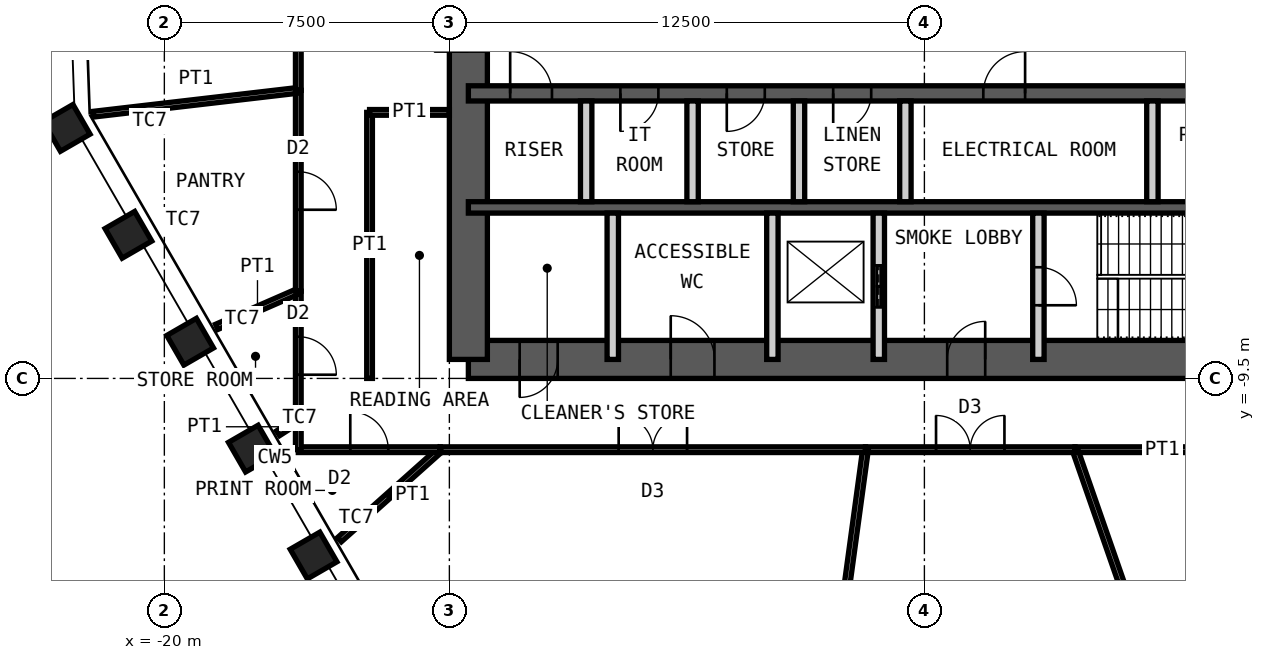
"""IFC4 building model, lengths in metres.
Left out: names, types, materials, properties, quantities, classifications, styles, units other than length and angle.
Written with IfcOpenShell. Run it as: python <this file> out.ifc"""

import sys

from ifc_helpers import new_model, si_unit, direction, frame, frame_2d, origin, origin_2d, place, context, subcontext, project, spatial, rectangle, hollow_rectangle, extrude, element, fill, save


model = new_model("IFC4")
c1 = context("Model", 3, precision=1e-05, world=origin(), true_north=direction((0.0, 1.0)))
c2 = subcontext(c1, "Body", "Model", "MODEL_VIEW")
j1 = project(units=[si_unit("LENGTHUNIT", "METRE"), si_unit("PLANEANGLEUNIT", "RADIAN")], contexts=[c1])
p1 = place(None, origin())
s1 = spatial("IfcSite", under=j1, at=p1, CompositionType="ELEMENT")
p2 = place(p1, origin())
s2 = spatial("IfcBuilding", under=s1, at=p2, CompositionType="ELEMENT")
p3 = place(p2, frame((0.0, 0.0, 287.2)))
s3 = spatial("IfcBuildingStorey", under=s2, at=p3, CompositionType="ELEMENT", Elevation=287.2)
for number, where, z_axis, x_axis in (
    (1, (-16.073, -14.16, 0.0), (0.0, 0.0, 1.0), (0.5, -0.866, 0.0)),
    (2, (-17.698, -11.347, 0.0), (0.0, 0.0, 1.0), (0.5, -0.866, 0.0)),
    (3, (-19.322, -8.534, 0.0), (0.0, 0.0, 1.0), (0.5, -0.866, 0.0)),
    (4, (-20.946, -5.721, 0.0), (0.0, 0.0, 1.0), (0.5, -0.866, 0.0)),
    (5, (-22.57, -2.908, 0.0), (0.0, 0.0, 1.0), (0.5, -0.866, 0.0)),
):
    element("IfcColumn", number, at=place(p3, frame(where, z_axis=z_axis, x_axis=x_axis)), inside=s3, PredefinedType="COLUMN", context=c2, shape_type="SweptSolid", body=[
        extrude(hollow_rectangle(XDim=0.9, YDim=0.9, WallThickness=0.06, at=origin_2d()), origin(), (0.0, 0.0, 1.0), 4.2),
    ])
p4 = place(p3, frame((-12.0, -9.0, 0.0), z_axis=(0.0, 0.0, 1.0), x_axis=(1.0, 0.0, 0.0)))
e6 = element("IfcWall", 6, at=p4, inside=s3, PredefinedType="SHEAR", context=c2, shape_type="SweptSolid", body=[
    extrude(rectangle(XDim=24.0, YDim=1.0, at=frame_2d((12.0, 0.0))), origin(), (0.0, 0.0, 1.0), 4.2),
])
p5 = place(p4, frame((1.35, 0.0, 0.0)))
e7 = element("IfcOpeningElement", 7, at=p5, cuts=e6, PredefinedType="OPENING", context=c2, shape_type="SweptSolid", body=[
    extrude(rectangle(XDim=1.0, YDim=2.1, at=frame_2d((0.5, 1.05))), frame((0.0, 0.51, 0.0), z_axis=(0.0, -1.0, 0.0), x_axis=(1.0, 0.0, 0.0)), (0.0, 0.0, 1.0), 1.02),
])
p6 = place(p4, frame((5.325, 0.0, 0.0)))
e8 = element("IfcOpeningElement", 8, at=p6, cuts=e6, PredefinedType="OPENING", context=c2, shape_type="SweptSolid", body=[
    extrude(rectangle(XDim=1.15, YDim=2.1, at=frame_2d((0.575, 1.05))), frame((0.0, 0.51, 0.0), z_axis=(0.0, -1.0, 0.0), x_axis=(1.0, 0.0, 0.0)), (0.0, 0.0, 1.0), 1.02),
])
p7 = place(p4, frame((12.6, 0.0, 0.0)))
e9 = element("IfcOpeningElement", 9, at=p7, cuts=e6, PredefinedType="OPENING", context=c2, shape_type="SweptSolid", body=[
    extrude(rectangle(XDim=1.0, YDim=2.1, at=frame_2d((0.5, 1.05))), frame((0.0, 0.51, 0.0), z_axis=(0.0, -1.0, 0.0), x_axis=(1.0, 0.0, 0.0)), (0.0, 0.0, 1.0), 1.02),
])
p8 = place(p3, frame((-12.0, -9.0, 0.0), z_axis=(0.0, 0.0, 1.0), x_axis=(0.0, 1.0, 0.0)))
e10 = element("IfcWall", 10, at=p8, inside=s3, PredefinedType="SHEAR", context=c2, shape_type="SweptSolid", body=[
    extrude(rectangle(XDim=18.0, YDim=1.0, at=frame_2d((9.0, 0.0))), origin(), (0.0, 0.0, 1.0), 4.2),
])
p9 = place(p8, frame((8.1, 0.0, 0.0)))
e11 = element("IfcOpeningElement", 11, at=p9, cuts=e10, PredefinedType="OPENING", context=c2, shape_type="SweptSolid", body=[
    extrude(rectangle(XDim=1.8, YDim=2.1, at=frame_2d((0.9, 1.05))), frame((0.0, 0.51, 0.0), z_axis=(0.0, -1.0, 0.0), x_axis=(1.0, 0.0, 0.0)), (0.0, 0.0, 1.0), 1.02),
])
p10 = place(p3, frame((-12.0, -2.0, 0.0), z_axis=(0.0, 0.0, 1.0), x_axis=(1.0, 0.0, 0.0)))
e12 = element("IfcWall", 12, at=p10, inside=s3, PredefinedType="SHEAR", context=c2, shape_type="SweptSolid", body=[
    extrude(rectangle(XDim=24.0, YDim=0.4, at=frame_2d((12.0, 0.0))), origin(), (0.0, 0.0, 1.0), 4.2),
])
p11 = place(p10, frame((1.1, 0.0, 0.0)))
e13 = element("IfcOpeningElement", 13, at=p11, cuts=e12, PredefinedType="OPENING", context=c2, shape_type="SweptSolid", body=[
    extrude(rectangle(XDim=1.1, YDim=2.1, at=frame_2d((0.55, 1.05))), frame((0.0, 0.21, 0.0), z_axis=(0.0, -1.0, 0.0), x_axis=(1.0, 0.0, 0.0)), (0.0, 0.0, 1.0), 0.42),
])
p12 = place(p10, frame((13.55, 0.0, 0.0)))
e14 = element("IfcOpeningElement", 14, at=p12, cuts=e12, PredefinedType="OPENING", context=c2, shape_type="SweptSolid", body=[
    extrude(rectangle(XDim=1.1, YDim=2.1, at=frame_2d((0.55, 1.05))), frame((0.0, 0.21, 0.0), z_axis=(0.0, -1.0, 0.0), x_axis=(1.0, 0.0, 0.0)), (0.0, 0.0, 1.0), 0.42),
])
p13 = place(p10, frame((20.7, 0.0, 0.0)))
e15 = element("IfcOpeningElement", 15, at=p13, cuts=e12, PredefinedType="OPENING", context=c2, shape_type="SweptSolid", body=[
    extrude(rectangle(XDim=1.1, YDim=2.1, at=frame_2d((0.55, 1.05))), frame((0.0, 0.21, 0.0), z_axis=(0.0, -1.0, 0.0), x_axis=(1.0, 0.0, 0.0)), (0.0, 0.0, 1.0), 0.42),
])
p14 = place(p10, frame((4.0, 0.0, 0.0)))
e16 = element("IfcOpeningElement", 16, at=p14, cuts=e12, PredefinedType="OPENING", context=c2, shape_type="SweptSolid", body=[
    extrude(rectangle(XDim=1.0, YDim=2.1, at=frame_2d((0.5, 1.05))), frame((0.0, 0.21, 0.0), z_axis=(0.0, -1.0, 0.0), x_axis=(1.0, 0.0, 0.0)), (0.0, 0.0, 1.0), 0.42),
])
p15 = place(p10, frame((6.8, 0.0, 0.0)))
e17 = element("IfcOpeningElement", 17, at=p15, cuts=e12, PredefinedType="OPENING", context=c2, shape_type="SweptSolid", body=[
    extrude(rectangle(XDim=1.0, YDim=2.1, at=frame_2d((0.5, 1.05))), frame((0.0, 0.21, 0.0), z_axis=(0.0, -1.0, 0.0), x_axis=(1.0, 0.0, 0.0)), (0.0, 0.0, 1.0), 0.42),
])
p16 = place(p10, frame((9.6, 0.0, 0.0)))
e18 = element("IfcOpeningElement", 18, at=p16, cuts=e12, PredefinedType="OPENING", context=c2, shape_type="SweptSolid", body=[
    extrude(rectangle(XDim=1.0, YDim=2.1, at=frame_2d((0.5, 1.05))), frame((0.0, 0.21, 0.0), z_axis=(0.0, -1.0, 0.0), x_axis=(1.0, 0.0, 0.0)), (0.0, 0.0, 1.0), 0.42),
])
p17 = place(p3, frame((-12.0, -5.0, 0.0), z_axis=(0.0, 0.0, 1.0), x_axis=(1.0, 0.0, 0.0)))
e19 = element("IfcWall", 19, at=p17, inside=s3, PredefinedType="SHEAR", context=c2, shape_type="SweptSolid", body=[
    extrude(rectangle(XDim=24.0, YDim=0.3, at=frame_2d((12.0, 0.0))), origin(), (0.0, 0.0, 1.0), 4.2),
])
for number, where, z_axis, x_axis in (
    (20, (-8.9, -4.85, 0.0), (0.0, 0.0, 1.0), (0.0, 1.0, 0.0)),
    (21, (-6.1, -4.85, 0.0), (0.0, 0.0, 1.0), (0.0, 1.0, 0.0)),
    (22, (-3.3, -4.85, 0.0), (0.0, 0.0, 1.0), (0.0, 1.0, 0.0)),
    (23, (-0.5, -4.85, 0.0), (0.0, 0.0, 1.0), (0.0, 1.0, 0.0)),
    (24, (6.0, -4.85, 0.0), (0.0, 0.0, 1.0), (0.0, 1.0, 0.0)),
):
    element("IfcWall", number, at=place(p3, frame(where, z_axis=z_axis, x_axis=x_axis)), inside=s3, PredefinedType="PARTITIONING", context=c2, shape_type="SweptSolid", body=[
        extrude(rectangle(XDim=2.65, YDim=0.3, at=frame_2d((1.325, 0.0))), origin(), (0.0, 0.0, 1.0), 3.98),
    ])
for number, where, z_axis, x_axis in (
    (25, (-8.2, -9.0, 0.0), (0.0, 0.0, 1.0), (0.0, 1.0, 0.0)),
    (26, (-4.0, -9.0, 0.0), (0.0, 0.0, 1.0), (0.0, 1.0, 0.0)),
):
    element("IfcWall", number, at=place(p3, frame(where, z_axis=z_axis, x_axis=x_axis)), inside=s3, PredefinedType="PARTITIONING", context=c2, shape_type="SweptSolid", body=[
        extrude(rectangle(XDim=3.85, YDim=0.3, at=frame_2d((1.925, 0.0))), origin(), (0.0, 0.0, 1.0), 3.98),
    ])
p18 = place(p3, frame((-1.2, -9.0, 0.0), z_axis=(0.0, 0.0, 1.0), x_axis=(0.0, 1.0, 0.0)))
e27 = element("IfcWall", 27, at=p18, inside=s3, PredefinedType="PARTITIONING", context=c2, shape_type="SweptSolid", body=[
    extrude(rectangle(XDim=3.85, YDim=0.3, at=frame_2d((1.925, 0.0))), origin(), (0.0, 0.0, 1.0), 3.98),
])
p19 = place(p18, frame((1.375, 0.0, 0.0)))
e28 = element("IfcOpeningElement", 28, at=p19, cuts=e27, PredefinedType="OPENING", context=c2, shape_type="SweptSolid", body=[
    extrude(rectangle(XDim=1.1, YDim=2.4, at=frame_2d((0.55, 1.2))), frame((0.0, 0.16, 0.0), z_axis=(0.0, -1.0, 0.0), x_axis=(1.0, 0.0, 0.0)), (0.0, 0.0, 1.0), 0.32),
])
p20 = place(p3, frame((3.0, -9.0, 0.0), z_axis=(0.0, 0.0, 1.0), x_axis=(0.0, 1.0, 0.0)))
e29 = element("IfcWall", 29, at=p20, inside=s3, PredefinedType="PARTITIONING", context=c2, shape_type="SweptSolid", body=[
    extrude(rectangle(XDim=3.85, YDim=0.3, at=frame_2d((1.925, 0.0))), origin(), (0.0, 0.0, 1.0), 3.98),
])
p21 = place(p20, frame((1.425, 0.0, 0.0)))
e30 = element("IfcOpeningElement", 30, at=p21, cuts=e29, PredefinedType="OPENING", context=c2, shape_type="SweptSolid", body=[
    extrude(rectangle(XDim=1.0, YDim=2.1, at=frame_2d((0.5, 1.05))), frame((0.0, 0.16, 0.0), z_axis=(0.0, -1.0, 0.0), x_axis=(1.0, 0.0, 0.0)), (0.0, 0.0, 1.0), 0.32),
])
p22 = place(p3, frame((15.44, -11.375, 0.0), z_axis=(0.0, 0.0, 1.0), x_axis=(-1.0, 0.0, 0.0)))
e31 = element("IfcWall", 31, at=p22, inside=s3, PredefinedType="PARTITIONING", context=c2, shape_type="SweptSolid", body=[
    extrude(rectangle(XDim=11.477, YDim=0.15, at=frame_2d((5.739, 0.0))), origin(), (0.0, 0.0, 1.0), 4.03),
])
p23 = place(p22, frame((4.839, 0.0, 0.0)))
e32 = element("IfcOpeningElement", 32, at=p23, cuts=e31, PredefinedType="OPENING", context=c2, shape_type="SweptSolid", body=[
    extrude(rectangle(XDim=1.8, YDim=2.4, at=frame_2d((0.9, 1.2))), frame((0.0, 0.085, 0.0), z_axis=(0.0, -1.0, 0.0), x_axis=(1.0, 0.0, 0.0)), (0.0, 0.0, 1.0), 0.17),
])
p24 = place(p3, frame((6.888, -19.771, 0.0), z_axis=(0.0, 0.0, 1.0), x_axis=(-0.328983865825, 0.944335542075, 0.0)))
e33 = element("IfcWall", 33, at=p24, inside=s3, PredefinedType="PARTITIONING", context=c2, shape_type="SweptSolid", body=[
    extrude(rectangle(XDim=8.891, YDim=0.15, at=frame_2d((4.446, 0.0))), origin(), (0.0, 0.0, 1.0), 3.33),
])
p25 = place(p3, frame((3.963, -11.375, 0.0), z_axis=(0.0, 0.0, 1.0), x_axis=(-1.0, 0.0, 0.0)))
e34 = element("IfcWall", 34, at=p25, inside=s3, PredefinedType="PARTITIONING", context=c2, shape_type="SweptSolid", body=[
    extrude(rectangle(XDim=5.513, YDim=0.15, at=frame_2d((2.756, 0.0))), origin(), (0.0, 0.0, 1.0), 4.03),
])
p26 = place(p25, frame((1.856, 0.0, 0.0)))
e35 = element("IfcOpeningElement", 35, at=p26, cuts=e34, PredefinedType="OPENING", context=c2, shape_type="SweptSolid", body=[
    extrude(rectangle(XDim=1.8, YDim=2.4, at=frame_2d((0.9, 1.2))), frame((0.0, 0.085, 0.0), z_axis=(0.0, -1.0, 0.0), x_axis=(1.0, 0.0, 0.0)), (0.0, 0.0, 1.0), 0.17),
])
p27 = place(p3, frame((-2.786, -20.446, 0.0), z_axis=(0.0, 0.0, 1.0), x_axis=(0.135041803834, 0.99083990191, 0.0)))
e36 = element("IfcWall", 36, at=p27, inside=s3, PredefinedType="PARTITIONING", context=c2, shape_type="SweptSolid", body=[
    extrude(rectangle(XDim=9.155, YDim=0.15, at=frame_2d((4.578, 0.0))), origin(), (0.0, 0.0, 1.0), 3.33),
])
p28 = place(p3, frame((-1.55, -11.375, 0.0), z_axis=(0.0, 0.0, 1.0), x_axis=(-1.0, 0.0, 0.0)))
e37 = element("IfcWall", 37, at=p28, inside=s3, PredefinedType="PARTITIONING", context=c2, shape_type="SweptSolid", body=[
    extrude(rectangle(XDim=11.19, YDim=0.15, at=frame_2d((5.595, 0.0))), origin(), (0.0, 0.0, 1.0), 4.03),
])
p29 = place(p28, frame((4.695, 0.0, 0.0)))
e38 = element("IfcOpeningElement", 38, at=p29, cuts=e37, PredefinedType="OPENING", context=c2, shape_type="SweptSolid", body=[
    extrude(rectangle(XDim=1.8, YDim=2.4, at=frame_2d((0.9, 1.2))), frame((0.0, 0.085, 0.0), z_axis=(0.0, -1.0, 0.0), x_axis=(1.0, 0.0, 0.0)), (0.0, 0.0, 1.0), 0.17),
])
p30 = place(p3, frame((-15.393, -13.743, 0.0), z_axis=(0.0, 0.0, 1.0), x_axis=(0.745934007174, 0.666019862273, 0.0)))
e39 = element("IfcWall", 39, at=p30, inside=s3, PredefinedType="PARTITIONING", context=c2, shape_type="SweptSolid", body=[
    extrude(rectangle(XDim=3.556, YDim=0.15, at=frame_2d((1.778, 0.0))), origin(), (0.0, 0.0, 1.0), 3.33),
])
p31 = place(p3, frame((-12.74, -11.375, 0.0), z_axis=(0.0, 0.0, 1.0), x_axis=(-1.0, 0.0, 0.0)))
e40 = element("IfcWall", 40, at=p31, inside=s3, PredefinedType="PARTITIONING", context=c2, shape_type="SweptSolid", body=[
    extrude(rectangle(XDim=3.735, YDim=0.15, at=frame_2d((1.868, 0.0))), origin(), (0.0, 0.0, 1.0), 4.03),
])
p32 = place(p31, frame((1.367, 0.0, 0.0)))
e41 = element("IfcOpeningElement", 41, at=p32, cuts=e40, PredefinedType="OPENING", context=c2, shape_type="SweptSolid", body=[
    extrude(rectangle(XDim=1.0, YDim=2.4, at=frame_2d((0.5, 1.2))), frame((0.0, 0.085, 0.0), z_axis=(0.0, -1.0, 0.0), x_axis=(1.0, 0.0, 0.0)), (0.0, 0.0, 1.0), 0.17),
])
p33 = place(p3, frame((-16.475, -11.375, 0.0), z_axis=(0.0, 0.0, 1.0), x_axis=(0.0, 1.0, 0.0)))
e42 = element("IfcWall", 42, at=p33, inside=s3, PredefinedType="PARTITIONING", context=c2, shape_type="SweptSolid", body=[
    extrude(rectangle(XDim=0.774, YDim=0.15, at=frame_2d((0.387, 0.0))), origin(), (0.0, 0.0, 1.0), 4.03),
])
p34 = place(p3, frame((-17.007, -10.943, 0.0), z_axis=(0.0, 0.0, 1.0), x_axis=(0.840789611822, 0.541362012568, 0.0)))
e43 = element("IfcWall", 43, at=p34, inside=s3, PredefinedType="PARTITIONING", context=c2, shape_type="SweptSolid", body=[
    extrude(rectangle(XDim=0.633, YDim=0.15, at=frame_2d((0.316, 0.0))), origin(), (0.0, 0.0, 1.0), 3.33),
])
p35 = place(p3, frame((-16.475, -10.601, 0.0), z_axis=(0.0, 0.0, 1.0), x_axis=(0.0, 1.0, 0.0)))
e44 = element("IfcWall", 44, at=p35, inside=s3, PredefinedType="PARTITIONING", context=c2, shape_type="SweptSolid", body=[
    extrude(rectangle(XDim=3.396, YDim=0.15, at=frame_2d((1.698, 0.0))), origin(), (0.0, 0.0, 1.0), 4.03),
])
p36 = place(p35, frame((1.198, 0.0, 0.0)))
e45 = element("IfcOpeningElement", 45, at=p36, cuts=e44, PredefinedType="OPENING", context=c2, shape_type="SweptSolid", body=[
    extrude(rectangle(XDim=1.0, YDim=2.4, at=frame_2d((0.5, 1.2))), frame((0.0, 0.085, 0.0), z_axis=(0.0, -1.0, 0.0), x_axis=(1.0, 0.0, 0.0)), (0.0, 0.0, 1.0), 0.17),
])
p37 = place(p3, frame((-18.624, -8.144, 0.0), z_axis=(0.0, 0.0, 1.0), x_axis=(0.916195562442, 0.400731445436, 0.0)))
e46 = element("IfcWall", 46, at=p37, inside=s3, PredefinedType="PARTITIONING", context=c2, shape_type="SweptSolid", body=[
    extrude(rectangle(XDim=2.345, YDim=0.15, at=frame_2d((1.172, 0.0))), origin(), (0.0, 0.0, 1.0), 3.33),
])
p38 = place(p3, frame((-16.475, -7.205, 0.0), z_axis=(0.0, 0.0, 1.0), x_axis=(0.0, 1.0, 0.0)))
e47 = element("IfcWall", 47, at=p38, inside=s3, PredefinedType="PARTITIONING", context=c2, shape_type="SweptSolid", body=[
    extrude(rectangle(XDim=5.285, YDim=0.15, at=frame_2d((2.643, 0.0))), origin(), (0.0, 0.0, 1.0), 4.03),
])
p39 = place(p38, frame((2.143, 0.0, 0.0)))
e48 = element("IfcOpeningElement", 48, at=p39, cuts=e47, PredefinedType="OPENING", context=c2, shape_type="SweptSolid", body=[
    extrude(rectangle(XDim=1.0, YDim=2.4, at=frame_2d((0.5, 1.2))), frame((0.0, 0.085, 0.0), z_axis=(0.0, -1.0, 0.0), x_axis=(1.0, 0.0, 0.0)), (0.0, 0.0, 1.0), 0.17),
])
p40 = place(p3, frame((-21.864, -2.547, 0.0), z_axis=(0.0, 0.0, 1.0), x_axis=(0.993284789299, 0.115694975458, 0.0)))
e49 = element("IfcWall", 49, at=p40, inside=s3, PredefinedType="PARTITIONING", context=c2, shape_type="SweptSolid", body=[
    extrude(rectangle(XDim=5.425, YDim=0.15, at=frame_2d((2.713, 0.0))), origin(), (0.0, 0.0, 1.0), 2.93),
])
p41 = place(p3, frame((-16.475, -1.919, 0.0), z_axis=(0.0, 0.0, 1.0), x_axis=(0.0, 1.0, 0.0)))
e50 = element("IfcWall", 50, at=p41, inside=s3, PredefinedType="PARTITIONING", context=c2, shape_type="SweptSolid", body=[
    extrude(rectangle(XDim=13.294, YDim=0.15, at=frame_2d((6.647, 0.0))), origin(), (0.0, 0.0, 1.0), 4.03),
])
p42 = place(p41, frame((5.747, 0.0, 0.0)))
e51 = element("IfcOpeningElement", 51, at=p42, cuts=e50, PredefinedType="OPENING", context=c2, shape_type="SweptSolid", body=[
    extrude(rectangle(XDim=1.8, YDim=2.4, at=frame_2d((0.9, 1.2))), frame((0.0, 0.085, 0.0), z_axis=(0.0, -1.0, 0.0), x_axis=(1.0, 0.0, 0.0)), (0.0, 0.0, 1.0), 0.17),
])
p43 = place(p3, frame((-14.6, -9.5, 0.0), z_axis=(0.0, 0.0, 1.0), x_axis=(0.0, 1.0, 0.0)))
e52 = element("IfcWall", 52, at=p43, inside=s3, PredefinedType="PARTITIONING", context=c2, shape_type="SweptSolid", body=[
    extrude(rectangle(XDim=7.0, YDim=0.15, at=frame_2d((3.5, 0.0))), origin(), (0.0, 0.0, 1.0), 4.03),
])
p44 = place(p3, frame((-12.5, -2.5, 0.0), z_axis=(0.0, 0.0, 1.0), x_axis=(-1.0, 0.0, 0.0)))
e53 = element("IfcWall", 53, at=p44, inside=s3, PredefinedType="PARTITIONING", context=c2, shape_type="SweptSolid", body=[
    extrude(rectangle(XDim=2.1, YDim=0.15, at=frame_2d((1.05, 0.0))), origin(), (0.0, 0.0, 1.0), 3.53),
])
p45 = place(p5, origin())
e54 = element("IfcDoor", 54, at=p45, inside=s3, OperationType="SINGLE_SWING_LEFT", PredefinedType="DOOR", context=c2, shape_type="SweptSolid", body=[
    extrude(rectangle(XDim=1.0, YDim=2.1, at=frame_2d((0.5, 1.05))), frame((0.0, 0.025, 0.0), z_axis=(0.0, -1.0, 0.0), x_axis=(1.0, 0.0, 0.0)), (0.0, 0.0, 1.0), 0.05),
])
fill(e7, e54)
p46 = place(p6, origin())
e55 = element("IfcDoor", 55, at=p46, inside=s3, OperationType="SINGLE_SWING_RIGHT", PredefinedType="DOOR", context=c2, shape_type="SweptSolid", body=[
    extrude(rectangle(XDim=1.15, YDim=2.1, at=frame_2d((0.575, 1.05))), frame((0.0, 0.025, 0.0), z_axis=(0.0, -1.0, 0.0), x_axis=(1.0, 0.0, 0.0)), (0.0, 0.0, 1.0), 0.05),
])
fill(e8, e55)
p47 = place(p7, origin())
e56 = element("IfcDoor", 56, at=p47, inside=s3, OperationType="SINGLE_SWING_LEFT", PredefinedType="DOOR", context=c2, shape_type="SweptSolid", body=[
    extrude(rectangle(XDim=1.0, YDim=2.1, at=frame_2d((0.5, 1.05))), frame((0.0, 0.025, 0.0), z_axis=(0.0, -1.0, 0.0), x_axis=(1.0, 0.0, 0.0)), (0.0, 0.0, 1.0), 0.05),
])
fill(e9, e56)
p48 = place(p21, origin())
e57 = element("IfcDoor", 57, at=p48, inside=s3, OperationType="SINGLE_SWING_LEFT", PredefinedType="DOOR", context=c2, shape_type="SweptSolid", body=[
    extrude(rectangle(XDim=1.0, YDim=2.1, at=frame_2d((0.5, 1.05))), frame((0.0, 0.025, 0.0), z_axis=(0.0, -1.0, 0.0), x_axis=(1.0, 0.0, 0.0)), (0.0, 0.0, 1.0), 0.05),
])
fill(e30, e57)
p49 = place(p11, origin())
e58 = element("IfcDoor", 58, at=p49, inside=s3, OperationType="SINGLE_SWING_RIGHT", PredefinedType="DOOR", context=c2, shape_type="SweptSolid", body=[
    extrude(rectangle(XDim=1.1, YDim=2.1, at=frame_2d((0.55, 1.05))), frame((0.0, 0.025, 0.0), z_axis=(0.0, -1.0, 0.0), x_axis=(1.0, 0.0, 0.0)), (0.0, 0.0, 1.0), 0.05),
])
fill(e13, e58)
p50 = place(p12, origin())
e59 = element("IfcDoor", 59, at=p50, inside=s3, OperationType="SINGLE_SWING_LEFT", PredefinedType="DOOR", context=c2, shape_type="SweptSolid", body=[
    extrude(rectangle(XDim=1.1, YDim=2.1, at=frame_2d((0.55, 1.05))), frame((0.0, 0.025, 0.0), z_axis=(0.0, -1.0, 0.0), x_axis=(1.0, 0.0, 0.0)), (0.0, 0.0, 1.0), 0.05),
])
fill(e14, e59)
p51 = place(p19, origin())
e60 = element("IfcDoor", 60, at=p51, inside=s3, OperationType="DOUBLE_DOOR_SLIDING", PredefinedType="DOOR", context=c2, shape_type="SweptSolid", body=[
    extrude(rectangle(XDim=1.1, YDim=2.4, at=frame_2d((0.55, 1.2))), frame((0.0, 0.025, 0.0), z_axis=(0.0, -1.0, 0.0), x_axis=(1.0, 0.0, 0.0)), (0.0, 0.0, 1.0), 0.05),
])
fill(e28, e60)
p52 = place(p14, origin())
e61 = element("IfcDoor", 61, at=p52, inside=s3, OperationType="SINGLE_SWING_LEFT", PredefinedType="DOOR", context=c2, shape_type="SweptSolid", body=[
    extrude(rectangle(XDim=1.0, YDim=2.1, at=frame_2d((0.5, 1.05))), frame((0.0, 0.025, 0.0), z_axis=(0.0, -1.0, 0.0), x_axis=(1.0, 0.0, 0.0)), (0.0, 0.0, 1.0), 0.05),
])
fill(e16, e61)
p53 = place(p15, origin())
e62 = element("IfcDoor", 62, at=p53, inside=s3, OperationType="SINGLE_SWING_LEFT", PredefinedType="DOOR", context=c2, shape_type="SweptSolid", body=[
    extrude(rectangle(XDim=1.0, YDim=2.1, at=frame_2d((0.5, 1.05))), frame((0.0, 0.025, 0.0), z_axis=(0.0, -1.0, 0.0), x_axis=(1.0, 0.0, 0.0)), (0.0, 0.0, 1.0), 0.05),
])
fill(e17, e62)
p54 = place(p16, origin())
e63 = element("IfcDoor", 63, at=p54, inside=s3, OperationType="SINGLE_SWING_LEFT", PredefinedType="DOOR", context=c2, shape_type="SweptSolid", body=[
    extrude(rectangle(XDim=1.0, YDim=2.1, at=frame_2d((0.5, 1.05))), frame((0.0, 0.025, 0.0), z_axis=(0.0, -1.0, 0.0), x_axis=(1.0, 0.0, 0.0)), (0.0, 0.0, 1.0), 0.05),
])
fill(e18, e63)
p55 = place(p26, origin())
e64 = element("IfcDoor", 64, at=p55, inside=s3, OperationType="DOUBLE_DOOR_DOUBLE_SWING", PredefinedType="DOOR", context=c2, shape_type="SweptSolid", body=[
    extrude(rectangle(XDim=1.8, YDim=2.4, at=frame_2d((0.9, 1.2))), frame((0.0, 0.025, 0.0), z_axis=(0.0, -1.0, 0.0), x_axis=(1.0, 0.0, 0.0)), (0.0, 0.0, 1.0), 0.05),
])
fill(e35, e64)
p56 = place(p29, origin())
e65 = element("IfcDoor", 65, at=p56, inside=s3, OperationType="DOUBLE_DOOR_DOUBLE_SWING", PredefinedType="DOOR", context=c2, shape_type="SweptSolid", body=[
    extrude(rectangle(XDim=1.8, YDim=2.4, at=frame_2d((0.9, 1.2))), frame((0.0, 0.025, 0.0), z_axis=(0.0, -1.0, 0.0), x_axis=(1.0, 0.0, 0.0)), (0.0, 0.0, 1.0), 0.05),
])
fill(e38, e65)
p57 = place(p32, origin())
e66 = element("IfcDoor", 66, at=p57, inside=s3, OperationType="SINGLE_SWING_RIGHT", PredefinedType="DOOR", context=c2, shape_type="SweptSolid", body=[
    extrude(rectangle(XDim=1.0, YDim=2.4, at=frame_2d((0.5, 1.2))), frame((0.0, 0.025, 0.0), z_axis=(0.0, -1.0, 0.0), x_axis=(1.0, 0.0, 0.0)), (0.0, 0.0, 1.0), 0.05),
])
fill(e41, e66)
p58 = place(p36, origin())
e67 = element("IfcDoor", 67, at=p58, inside=s3, OperationType="SINGLE_SWING_LEFT", PredefinedType="DOOR", context=c2, shape_type="SweptSolid", body=[
    extrude(rectangle(XDim=1.0, YDim=2.4, at=frame_2d((0.5, 1.2))), frame((0.0, 0.025, 0.0), z_axis=(0.0, -1.0, 0.0), x_axis=(1.0, 0.0, 0.0)), (0.0, 0.0, 1.0), 0.05),
])
fill(e45, e67)
p59 = place(p39, origin())
e68 = element("IfcDoor", 68, at=p59, inside=s3, OperationType="SINGLE_SWING_LEFT", PredefinedType="DOOR", context=c2, shape_type="SweptSolid", body=[
    extrude(rectangle(XDim=1.0, YDim=2.4, at=frame_2d((0.5, 1.2))), frame((0.0, 0.025, 0.0), z_axis=(0.0, -1.0, 0.0), x_axis=(1.0, 0.0, 0.0)), (0.0, 0.0, 1.0), 0.05),
])
fill(e48, e68)
save(model, sys.argv[1])
